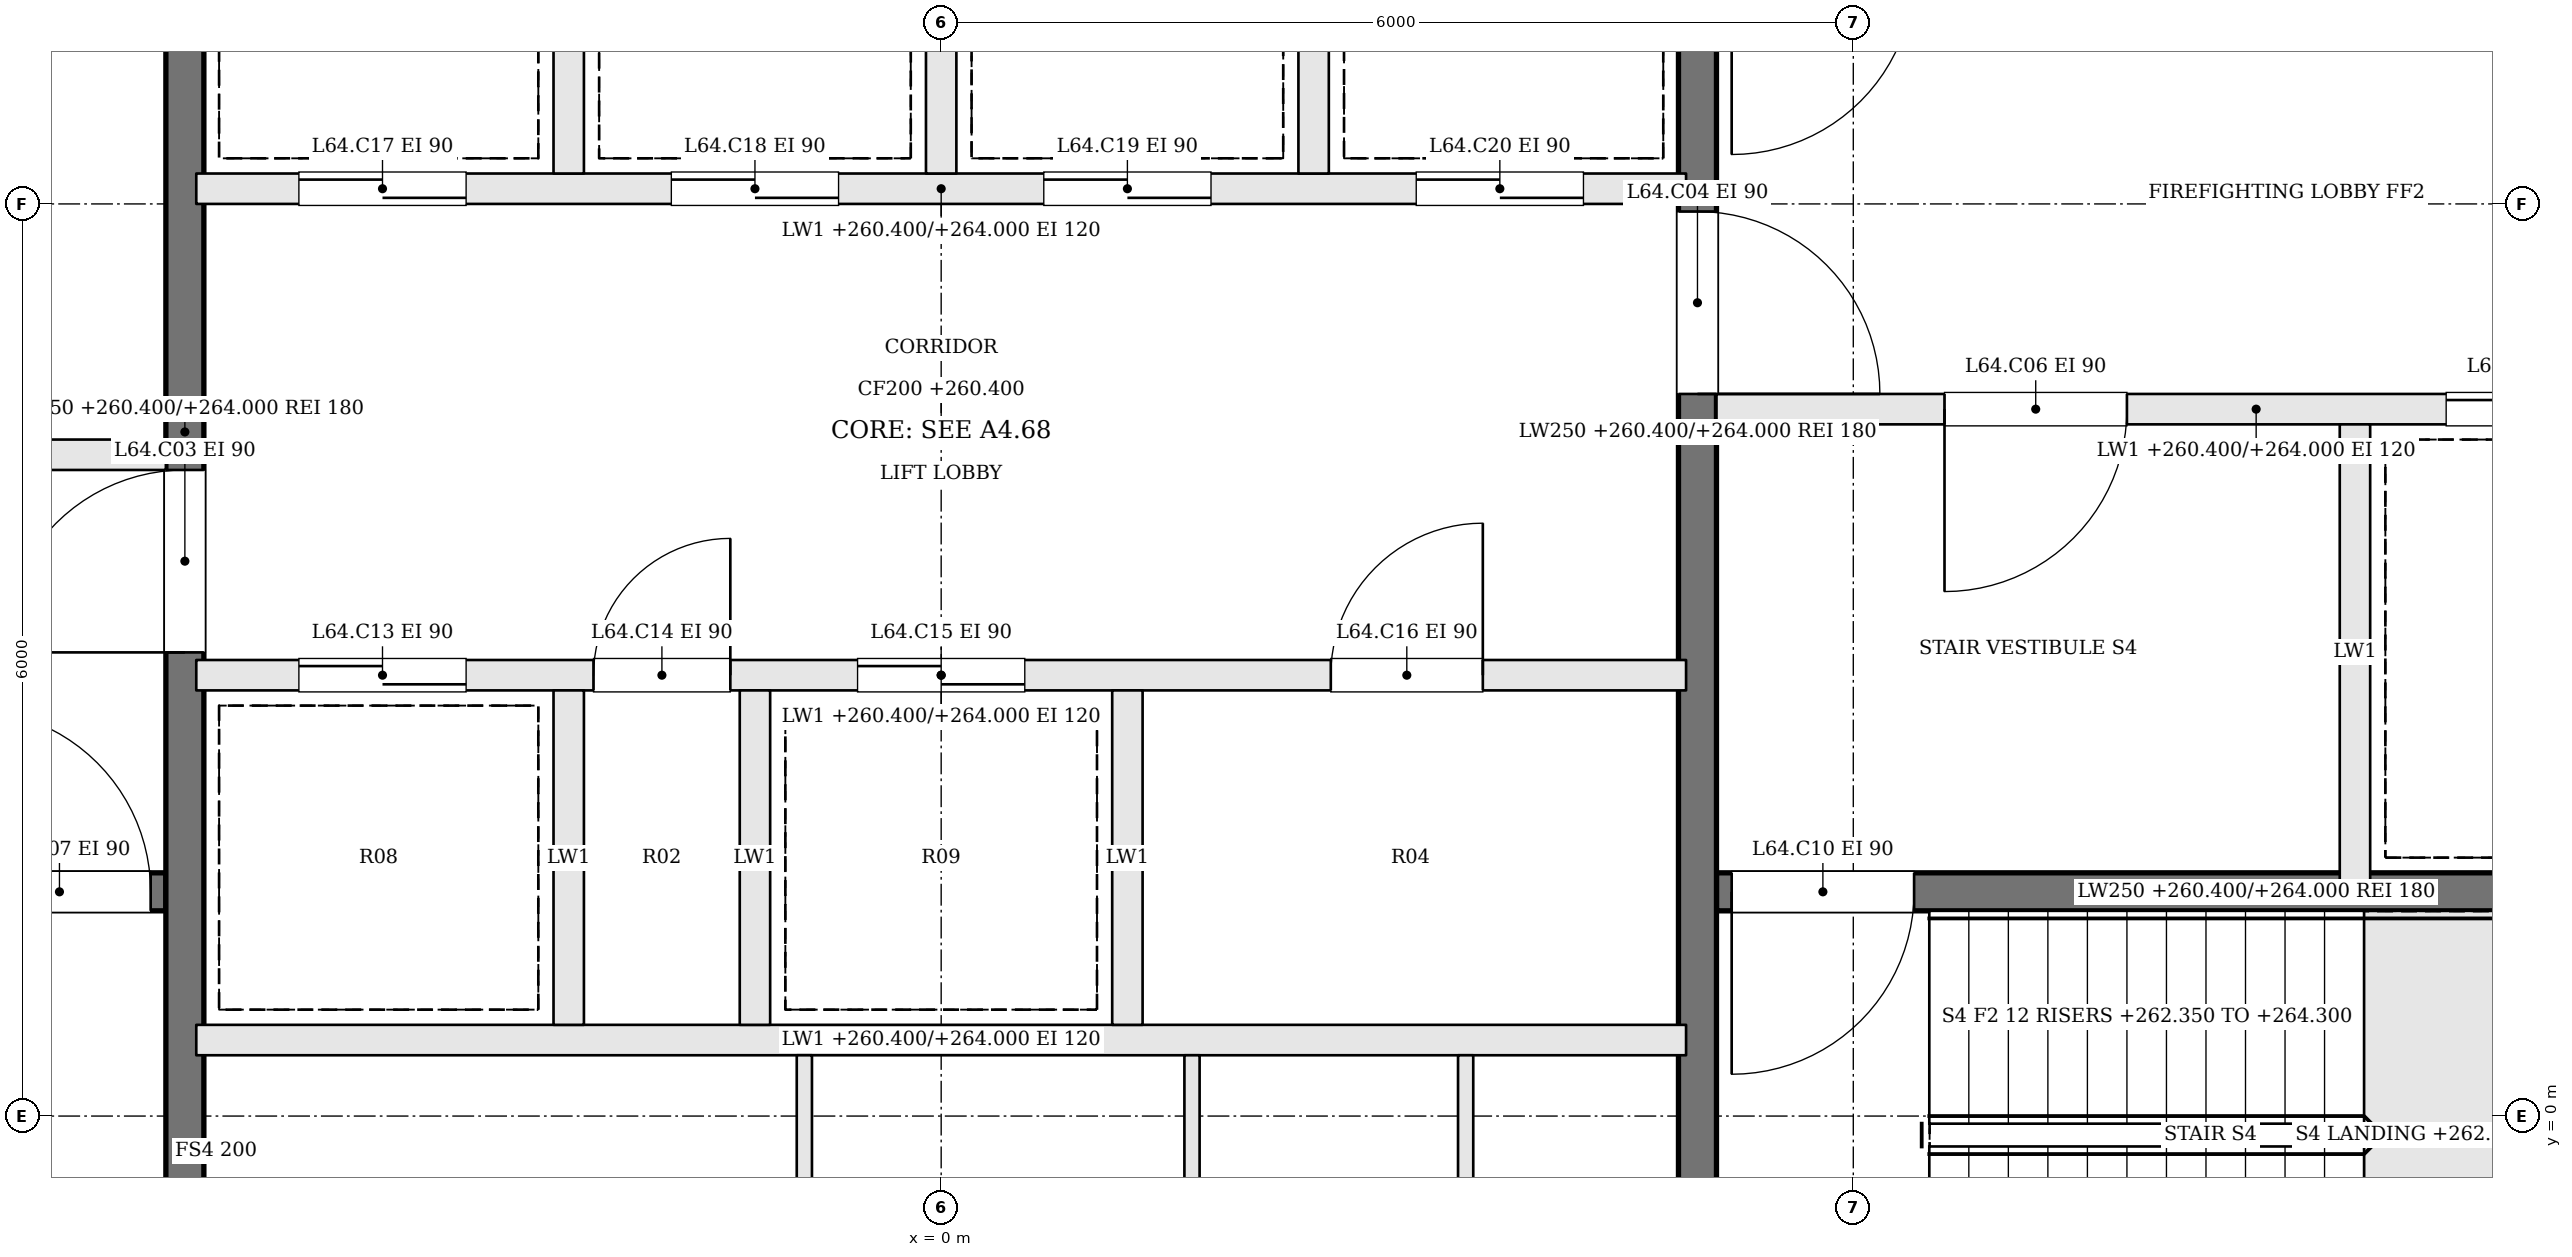
"""IFC4 building model, lengths in metres.
Left out: names, types, materials, properties, quantities, classifications, styles, units other than length and angle.
Written with IfcOpenShell. Run it as: python <this file> out.ifc"""

import sys

from ifc_helpers import new_model, si_unit, direction, frame, frame_2d, origin, place, context, subcontext, project, spatial, rectangle, extrude, element, fill, save


model = new_model("IFC4")
c1 = context("Model", 3, precision=1e-05, world=origin(), true_north=direction((0.0, 1.0)))
c2 = subcontext(c1, "Body", "Model", "MODEL_VIEW")
j1 = project(units=[si_unit("LENGTHUNIT", "METRE"), si_unit("PLANEANGLEUNIT", "RADIAN")], contexts=[c1])
p1 = place(None, origin())
s1 = spatial("IfcSite", under=j1, at=p1, CompositionType="ELEMENT")
p2 = place(p1, origin())
s2 = spatial("IfcBuilding", under=s1, at=p2, CompositionType="ELEMENT")
p3 = place(p2, frame((0.0, 0.0, 260.4)))
s3 = spatial("IfcBuildingStorey", under=s2, at=p3, CompositionType="ELEMENT", Elevation=260.4)
p4 = place(p3, frame((-12.2, 1.475, 0.0), z_axis=(0.0, 0.0, 1.0), x_axis=(1.0, 0.0, 0.0)))
e1 = element("IfcWall", 1, at=p4, inside=s3, PredefinedType="SOLIDWALL", context=c2, shape_type="SweptSolid", body=[
    extrude(rectangle(XDim=7.1, YDim=0.25, at=frame_2d((3.55, 0.0))), origin(), (0.0, 0.0, 1.0), 3.6),
])
p5 = place(p4, frame((5.8, 0.0, 0.0)))
e2 = element("IfcOpeningElement", 2, at=p5, cuts=e1, PredefinedType="OPENING", context=c2, shape_type="SweptSolid", body=[
    extrude(rectangle(XDim=1.2, YDim=2.1, at=frame_2d((0.6, 1.05))), frame((0.0, 0.135, 0.0), z_axis=(0.0, -1.0, 0.0), x_axis=(1.0, 0.0, 0.0)), (0.0, 0.0, 1.0), 0.27),
])
p6 = place(p3, frame((-12.2, 4.35, 0.0), z_axis=(0.0, 0.0, 1.0), x_axis=(1.0, 0.0, 0.0)))
e3 = element("IfcWall", 3, at=p6, inside=s3, PredefinedType="SOLIDWALL", context=c2, shape_type="SweptSolid", body=[
    extrude(rectangle(XDim=7.1, YDim=0.2, at=frame_2d((3.55, 0.0))), origin(), (0.0, 0.0, 1.0), 3.6),
])
p7 = place(p6, frame((4.4, 0.0, 0.0)))
e4 = element("IfcOpeningElement", 4, at=p7, cuts=e3, PredefinedType="OPENING", context=c2, shape_type="SweptSolid", body=[
    extrude(rectangle(XDim=1.2, YDim=2.1, at=frame_2d((0.6, 1.05))), frame((0.0, 0.11, 0.0), z_axis=(0.0, -1.0, 0.0), x_axis=(1.0, 0.0, 0.0)), (0.0, 0.0, 1.0), 0.22),
])
p8 = place(p6, frame((1.1, 0.0, 0.0)))
e5 = element("IfcOpeningElement", 5, at=p8, cuts=e3, PredefinedType="OPENING", context=c2, shape_type="SweptSolid", body=[
    extrude(rectangle(XDim=1.2, YDim=2.1, at=frame_2d((0.6, 1.05))), frame((0.0, 0.11, 0.0), z_axis=(0.0, -1.0, 0.0), x_axis=(1.0, 0.0, 0.0)), (0.0, 0.0, 1.0), 0.22),
])
p9 = place(p3, frame((12.2, 4.65, 0.0), z_axis=(0.0, 0.0, 1.0), x_axis=(-1.0, 0.0, 0.0)))
e6 = element("IfcWall", 6, at=p9, inside=s3, PredefinedType="SOLIDWALL", context=c2, shape_type="SweptSolid", body=[
    extrude(rectangle(XDim=7.1, YDim=0.2, at=frame_2d((3.55, 0.0))), origin(), (0.0, 0.0, 1.0), 3.6),
])
p10 = place(p9, frame((4.4, 0.0, 0.0)))
e7 = element("IfcOpeningElement", 7, at=p10, cuts=e6, PredefinedType="OPENING", context=c2, shape_type="SweptSolid", body=[
    extrude(rectangle(XDim=1.2, YDim=2.1, at=frame_2d((0.6, 1.05))), frame((0.0, 0.11, 0.0), z_axis=(0.0, -1.0, 0.0), x_axis=(1.0, 0.0, 0.0)), (0.0, 0.0, 1.0), 0.22),
])
p11 = place(p9, frame((1.1, 0.0, 0.0)))
e8 = element("IfcOpeningElement", 8, at=p11, cuts=e6, PredefinedType="OPENING", context=c2, shape_type="SweptSolid", body=[
    extrude(rectangle(XDim=1.2, YDim=2.1, at=frame_2d((0.6, 1.05))), frame((0.0, 0.11, 0.0), z_axis=(0.0, -1.0, 0.0), x_axis=(1.0, 0.0, 0.0)), (0.0, 0.0, 1.0), 0.22),
])
p12 = place(p3, frame((12.2, 1.475, 0.0), z_axis=(0.0, 0.0, 1.0), x_axis=(-1.0, 0.0, 0.0)))
e9 = element("IfcWall", 9, at=p12, inside=s3, PredefinedType="SOLIDWALL", context=c2, shape_type="SweptSolid", body=[
    extrude(rectangle(XDim=7.1, YDim=0.25, at=frame_2d((3.55, 0.0))), origin(), (0.0, 0.0, 1.0), 3.6),
])
p13 = place(p12, frame((5.8, 0.0, 0.0)))
e10 = element("IfcOpeningElement", 10, at=p13, cuts=e9, PredefinedType="OPENING", context=c2, shape_type="SweptSolid", body=[
    extrude(rectangle(XDim=1.2, YDim=2.1, at=frame_2d((0.6, 1.05))), frame((0.0, 0.135, 0.0), z_axis=(0.0, -1.0, 0.0), x_axis=(1.0, 0.0, 0.0)), (0.0, 0.0, 1.0), 0.27),
])
p14 = place(p3, frame((9.3, 4.55, 0.0), z_axis=(0.0, 0.0, 1.0), x_axis=(0.0, -1.0, 0.0)))
e11 = element("IfcWall", 11, at=p14, inside=s3, PredefinedType="SOLIDWALL", context=c2, shape_type="SweptSolid", body=[
    extrude(rectangle(XDim=3.0, YDim=0.2, at=frame_2d((1.5, 0.0))), origin(), (0.0, 0.0, 1.0), 3.6),
])
p15 = place(p3, frame((-4.975, -2.2, 0.0), z_axis=(0.0, 0.0, 1.0), x_axis=(0.0, 1.0, 0.0)))
e12 = element("IfcWall", 12, at=p15, inside=s3, PredefinedType="SOLIDWALL", context=c2, shape_type="SweptSolid", body=[
    extrude(rectangle(XDim=13.4, YDim=0.25, at=frame_2d((6.7, 0.0))), origin(), (0.0, 0.0, 1.0), 3.6),
])
p16 = place(p15, frame((5.25, 0.0, 0.0)))
e13 = element("IfcOpeningElement", 13, at=p16, cuts=e12, PredefinedType="OPENING", context=c2, shape_type="SweptSolid", body=[
    extrude(rectangle(XDim=1.2, YDim=2.1, at=frame_2d((0.6, 1.05))), frame((0.0, 0.135, 0.0), z_axis=(0.0, -1.0, 0.0), x_axis=(1.0, 0.0, 0.0)), (0.0, 0.0, 1.0), 0.27),
])
p17 = place(p3, frame((4.975, 11.2, 0.0), z_axis=(0.0, 0.0, 1.0), x_axis=(0.0, -1.0, 0.0)))
e14 = element("IfcWall", 14, at=p17, inside=s3, PredefinedType="SOLIDWALL", context=c2, shape_type="SweptSolid", body=[
    extrude(rectangle(XDim=13.4, YDim=0.25, at=frame_2d((6.7, 0.0))), origin(), (0.0, 0.0, 1.0), 3.6),
])
p18 = place(p17, frame((5.25, 0.0, 0.0)))
e15 = element("IfcOpeningElement", 15, at=p18, cuts=e14, PredefinedType="OPENING", context=c2, shape_type="SweptSolid", body=[
    extrude(rectangle(XDim=1.2, YDim=2.1, at=frame_2d((0.6, 1.05))), frame((0.0, 0.135, 0.0), z_axis=(0.0, -1.0, 0.0), x_axis=(1.0, 0.0, 0.0)), (0.0, 0.0, 1.0), 0.27),
])
p19 = place(p3, frame((-4.9, 0.5, 0.0), z_axis=(0.0, 0.0, 1.0), x_axis=(1.0, 0.0, 0.0)))
e16 = element("IfcWall", 16, at=p19, inside=s3, PredefinedType="SOLIDWALL", context=c2, shape_type="SweptSolid", body=[
    extrude(rectangle(XDim=9.8, YDim=0.2, at=frame_2d((4.9, 0.0))), origin(), (0.0, 0.0, 1.0), 3.6),
])
p20 = place(p3, frame((-4.9, 2.9, 0.0), z_axis=(0.0, 0.0, 1.0), x_axis=(1.0, 0.0, 0.0)))
e17 = element("IfcWall", 17, at=p20, inside=s3, PredefinedType="SOLIDWALL", context=c2, shape_type="SweptSolid", body=[
    extrude(rectangle(XDim=9.8, YDim=0.2, at=frame_2d((4.9, 0.0))), origin(), (0.0, 0.0, 1.0), 3.6),
])
p21 = place(p20, frame((0.675, 0.0, 0.0)))
e18 = element("IfcOpeningElement", 18, at=p21, cuts=e17, PredefinedType="OPENING", context=c2, shape_type="SweptSolid", body=[
    extrude(rectangle(XDim=1.1, YDim=2.1, at=frame_2d((0.55, 1.05))), frame((0.0, 0.11, 0.0), z_axis=(0.0, -1.0, 0.0), x_axis=(1.0, 0.0, 0.0)), (0.0, 0.0, 1.0), 0.22),
])
p22 = place(p20, frame((2.613, 0.0, 0.0)))
e19 = element("IfcOpeningElement", 19, at=p22, cuts=e17, PredefinedType="OPENING", context=c2, shape_type="SweptSolid", body=[
    extrude(rectangle(XDim=0.9, YDim=2.1, at=frame_2d((0.45, 1.05))), frame((0.0, 0.11, 0.0), z_axis=(0.0, -1.0, 0.0), x_axis=(1.0, 0.0, 0.0)), (0.0, 0.0, 1.0), 0.22),
])
p23 = place(p20, frame((4.35, 0.0, 0.0)))
e20 = element("IfcOpeningElement", 20, at=p23, cuts=e17, PredefinedType="OPENING", context=c2, shape_type="SweptSolid", body=[
    extrude(rectangle(XDim=1.1, YDim=2.1, at=frame_2d((0.55, 1.05))), frame((0.0, 0.11, 0.0), z_axis=(0.0, -1.0, 0.0), x_axis=(1.0, 0.0, 0.0)), (0.0, 0.0, 1.0), 0.22),
])
p24 = place(p20, frame((7.463, 0.0, 0.0)))
e21 = element("IfcOpeningElement", 21, at=p24, cuts=e17, PredefinedType="OPENING", context=c2, shape_type="SweptSolid", body=[
    extrude(rectangle(XDim=1.0, YDim=2.1, at=frame_2d((0.5, 1.05))), frame((0.0, 0.11, 0.0), z_axis=(0.0, -1.0, 0.0), x_axis=(1.0, 0.0, 0.0)), (0.0, 0.0, 1.0), 0.22),
])
p25 = place(p3, frame((-4.9, 6.1, 0.0), z_axis=(0.0, 0.0, 1.0), x_axis=(1.0, 0.0, 0.0)))
e22 = element("IfcWall", 22, at=p25, inside=s3, PredefinedType="SOLIDWALL", context=c2, shape_type="SweptSolid", body=[
    extrude(rectangle(XDim=9.8, YDim=0.2, at=frame_2d((4.9, 0.0))), origin(), (0.0, 0.0, 1.0), 3.6),
])
p26 = place(p25, frame((0.675, 0.0, 0.0)))
e23 = element("IfcOpeningElement", 23, at=p26, cuts=e22, PredefinedType="OPENING", context=c2, shape_type="SweptSolid", body=[
    extrude(rectangle(XDim=1.1, YDim=2.1, at=frame_2d((0.55, 1.05))), frame((0.0, 0.11, 0.0), z_axis=(0.0, -1.0, 0.0), x_axis=(1.0, 0.0, 0.0)), (0.0, 0.0, 1.0), 0.22),
])
p27 = place(p25, frame((3.125, 0.0, 0.0)))
e24 = element("IfcOpeningElement", 24, at=p27, cuts=e22, PredefinedType="OPENING", context=c2, shape_type="SweptSolid", body=[
    extrude(rectangle(XDim=1.1, YDim=2.1, at=frame_2d((0.55, 1.05))), frame((0.0, 0.11, 0.0), z_axis=(0.0, -1.0, 0.0), x_axis=(1.0, 0.0, 0.0)), (0.0, 0.0, 1.0), 0.22),
])
p28 = place(p25, frame((5.575, 0.0, 0.0)))
e25 = element("IfcOpeningElement", 25, at=p28, cuts=e22, PredefinedType="OPENING", context=c2, shape_type="SweptSolid", body=[
    extrude(rectangle(XDim=1.1, YDim=2.1, at=frame_2d((0.55, 1.05))), frame((0.0, 0.11, 0.0), z_axis=(0.0, -1.0, 0.0), x_axis=(1.0, 0.0, 0.0)), (0.0, 0.0, 1.0), 0.22),
])
p29 = place(p25, frame((8.025, 0.0, 0.0)))
e26 = element("IfcOpeningElement", 26, at=p29, cuts=e22, PredefinedType="OPENING", context=c2, shape_type="SweptSolid", body=[
    extrude(rectangle(XDim=1.1, YDim=2.1, at=frame_2d((0.55, 1.05))), frame((0.0, 0.11, 0.0), z_axis=(0.0, -1.0, 0.0), x_axis=(1.0, 0.0, 0.0)), (0.0, 0.0, 1.0), 0.22),
])
for number, where, z_axis, x_axis in (
    (27, (-2.45, 0.6, 0.0), (0.0, 0.0, 1.0), (0.0, 1.0, 0.0)),
    (28, (-1.225, 0.6, 0.0), (0.0, 0.0, 1.0), (0.0, 1.0, 0.0)),
    (29, (1.225, 0.6, 0.0), (0.0, 0.0, 1.0), (0.0, 1.0, 0.0)),
    (30, (-2.45, 6.2, 0.0), (0.0, 0.0, 1.0), (0.0, 1.0, 0.0)),
    (31, (0.0, 6.2, 0.0), (0.0, 0.0, 1.0), (0.0, 1.0, 0.0)),
    (32, (2.45, 6.2, 0.0), (0.0, 0.0, 1.0), (0.0, 1.0, 0.0)),
):
    element("IfcWall", number, at=place(p3, frame(where, z_axis=z_axis, x_axis=x_axis)), inside=s3, PredefinedType="SOLIDWALL", context=c2, shape_type="SweptSolid", body=[
        extrude(rectangle(XDim=2.2, YDim=0.2, at=frame_2d((1.1, 0.0))), origin(), (0.0, 0.0, 1.0), 3.6),
    ])
for number, where, z_axis, x_axis in (
    (33, (-0.9, -2.2, 0.0), (0.0, 0.0, 1.0), (0.0, 1.0, 0.0)),
    (34, (1.65, -2.2, 0.0), (0.0, 0.0, 1.0), (0.0, 1.0, 0.0)),
    (35, (3.45, -2.2, 0.0), (0.0, 0.0, 1.0), (0.0, 1.0, 0.0)),
):
    element("IfcWall", number, at=place(p3, frame(where, z_axis=z_axis, x_axis=x_axis)), inside=s3, PredefinedType="PARTITIONING", context=c2, shape_type="SweptSolid", body=[
        extrude(rectangle(XDim=2.6, YDim=0.1, at=frame_2d((1.3, 0.0))), origin(), (0.0, 0.0, 1.0), 3.6),
    ])
p30 = place(p16, origin())
e36 = element("IfcDoor", 36, at=p30, inside=s3, OperationType="SINGLE_SWING_LEFT", PredefinedType="DOOR", context=c2, shape_type="SweptSolid", body=[
    extrude(rectangle(XDim=1.2, YDim=2.1, at=frame_2d((0.6, 1.05))), frame((0.0, 0.025, 0.0), z_axis=(0.0, -1.0, 0.0), x_axis=(1.0, 0.0, 0.0)), (0.0, 0.0, 1.0), 0.05),
])
fill(e13, e36)
p31 = place(p18, origin())
e37 = element("IfcDoor", 37, at=p31, inside=s3, OperationType="SINGLE_SWING_RIGHT", PredefinedType="DOOR", context=c2, shape_type="SweptSolid", body=[
    extrude(rectangle(XDim=1.2, YDim=2.1, at=frame_2d((0.6, 1.05))), frame((0.0, 0.025, 0.0), z_axis=(0.0, -1.0, 0.0), x_axis=(1.0, 0.0, 0.0)), (0.0, 0.0, 1.0), 0.05),
])
fill(e15, e37)
p32 = place(p10, origin())
e38 = element("IfcDoor", 38, at=p32, inside=s3, OperationType="SINGLE_SWING_RIGHT", PredefinedType="DOOR", context=c2, shape_type="SweptSolid", body=[
    extrude(rectangle(XDim=1.2, YDim=2.1, at=frame_2d((0.6, 1.05))), frame((0.0, 0.025, 0.0), z_axis=(0.0, -1.0, 0.0), x_axis=(1.0, 0.0, 0.0)), (0.0, 0.0, 1.0), 0.05),
])
fill(e7, e38)
p33 = place(p5, origin())
e39 = element("IfcDoor", 39, at=p33, inside=s3, OperationType="SINGLE_SWING_LEFT", PredefinedType="DOOR", context=c2, shape_type="SweptSolid", body=[
    extrude(rectangle(XDim=1.2, YDim=2.1, at=frame_2d((0.6, 1.05))), frame((0.0, 0.025, 0.0), z_axis=(0.0, -1.0, 0.0), x_axis=(1.0, 0.0, 0.0)), (0.0, 0.0, 1.0), 0.05),
])
fill(e2, e39)
p34 = place(p13, origin())
e40 = element("IfcDoor", 40, at=p34, inside=s3, OperationType="SINGLE_SWING_RIGHT", PredefinedType="DOOR", context=c2, shape_type="SweptSolid", body=[
    extrude(rectangle(XDim=1.2, YDim=2.1, at=frame_2d((0.6, 1.05))), frame((0.0, 0.025, 0.0), z_axis=(0.0, -1.0, 0.0), x_axis=(1.0, 0.0, 0.0)), (0.0, 0.0, 1.0), 0.05),
])
fill(e10, e40)
p35 = place(p11, origin())
e41 = element("IfcDoor", 41, at=p35, inside=s3, OperationType="SLIDING_TO_RIGHT", PredefinedType="DOOR", context=c2, shape_type="SweptSolid", body=[
    extrude(rectangle(XDim=1.2, YDim=2.1, at=frame_2d((0.6, 1.05))), frame((0.0, 0.025, 0.0), z_axis=(0.0, -1.0, 0.0), x_axis=(1.0, 0.0, 0.0)), (0.0, 0.0, 1.0), 0.05),
])
fill(e8, e41)
p36 = place(p21, origin())
e42 = element("IfcDoor", 42, at=p36, inside=s3, OperationType="SLIDING_TO_RIGHT", PredefinedType="DOOR", context=c2, shape_type="SweptSolid", body=[
    extrude(rectangle(XDim=1.1, YDim=2.1, at=frame_2d((0.55, 1.05))), frame((0.0, 0.025, 0.0), z_axis=(0.0, -1.0, 0.0), x_axis=(1.0, 0.0, 0.0)), (0.0, 0.0, 1.0), 0.05),
])
fill(e18, e42)
p37 = place(p22, origin())
e43 = element("IfcDoor", 43, at=p37, inside=s3, OperationType="SINGLE_SWING_RIGHT", PredefinedType="DOOR", context=c2, shape_type="SweptSolid", body=[
    extrude(rectangle(XDim=0.9, YDim=2.1, at=frame_2d((0.45, 1.05))), frame((0.0, 0.025, 0.0), z_axis=(0.0, -1.0, 0.0), x_axis=(1.0, 0.0, 0.0)), (0.0, 0.0, 1.0), 0.05),
])
fill(e19, e43)
p38 = place(p23, origin())
e44 = element("IfcDoor", 44, at=p38, inside=s3, OperationType="SLIDING_TO_LEFT", PredefinedType="DOOR", context=c2, shape_type="SweptSolid", body=[
    extrude(rectangle(XDim=1.1, YDim=2.1, at=frame_2d((0.55, 1.05))), frame((0.0, 0.025, 0.0), z_axis=(0.0, -1.0, 0.0), x_axis=(1.0, 0.0, 0.0)), (0.0, 0.0, 1.0), 0.05),
])
fill(e20, e44)
p39 = place(p24, origin())
e45 = element("IfcDoor", 45, at=p39, inside=s3, OperationType="SINGLE_SWING_RIGHT", PredefinedType="DOOR", context=c2, shape_type="SweptSolid", body=[
    extrude(rectangle(XDim=1.0, YDim=2.1, at=frame_2d((0.5, 1.05))), frame((0.0, 0.025, 0.0), z_axis=(0.0, -1.0, 0.0), x_axis=(1.0, 0.0, 0.0)), (0.0, 0.0, 1.0), 0.05),
])
fill(e21, e45)
p40 = place(p26, origin())
e46 = element("IfcDoor", 46, at=p40, inside=s3, OperationType="SLIDING_TO_RIGHT", PredefinedType="DOOR", context=c2, shape_type="SweptSolid", body=[
    extrude(rectangle(XDim=1.1, YDim=2.1, at=frame_2d((0.55, 1.05))), frame((0.0, 0.025, 0.0), z_axis=(0.0, -1.0, 0.0), x_axis=(1.0, 0.0, 0.0)), (0.0, 0.0, 1.0), 0.05),
])
fill(e23, e46)
p41 = place(p27, origin())
e47 = element("IfcDoor", 47, at=p41, inside=s3, OperationType="SLIDING_TO_LEFT", PredefinedType="DOOR", context=c2, shape_type="SweptSolid", body=[
    extrude(rectangle(XDim=1.1, YDim=2.1, at=frame_2d((0.55, 1.05))), frame((0.0, 0.025, 0.0), z_axis=(0.0, -1.0, 0.0), x_axis=(1.0, 0.0, 0.0)), (0.0, 0.0, 1.0), 0.05),
])
fill(e24, e47)
p42 = place(p28, origin())
e48 = element("IfcDoor", 48, at=p42, inside=s3, OperationType="SLIDING_TO_RIGHT", PredefinedType="DOOR", context=c2, shape_type="SweptSolid", body=[
    extrude(rectangle(XDim=1.1, YDim=2.1, at=frame_2d((0.55, 1.05))), frame((0.0, 0.025, 0.0), z_axis=(0.0, -1.0, 0.0), x_axis=(1.0, 0.0, 0.0)), (0.0, 0.0, 1.0), 0.05),
])
fill(e25, e48)
p43 = place(p29, origin())
e49 = element("IfcDoor", 49, at=p43, inside=s3, OperationType="SLIDING_TO_LEFT", PredefinedType="DOOR", context=c2, shape_type="SweptSolid", body=[
    extrude(rectangle(XDim=1.1, YDim=2.1, at=frame_2d((0.55, 1.05))), frame((0.0, 0.025, 0.0), z_axis=(0.0, -1.0, 0.0), x_axis=(1.0, 0.0, 0.0)), (0.0, 0.0, 1.0), 0.05),
])
fill(e26, e49)
save(model, sys.argv[1])
